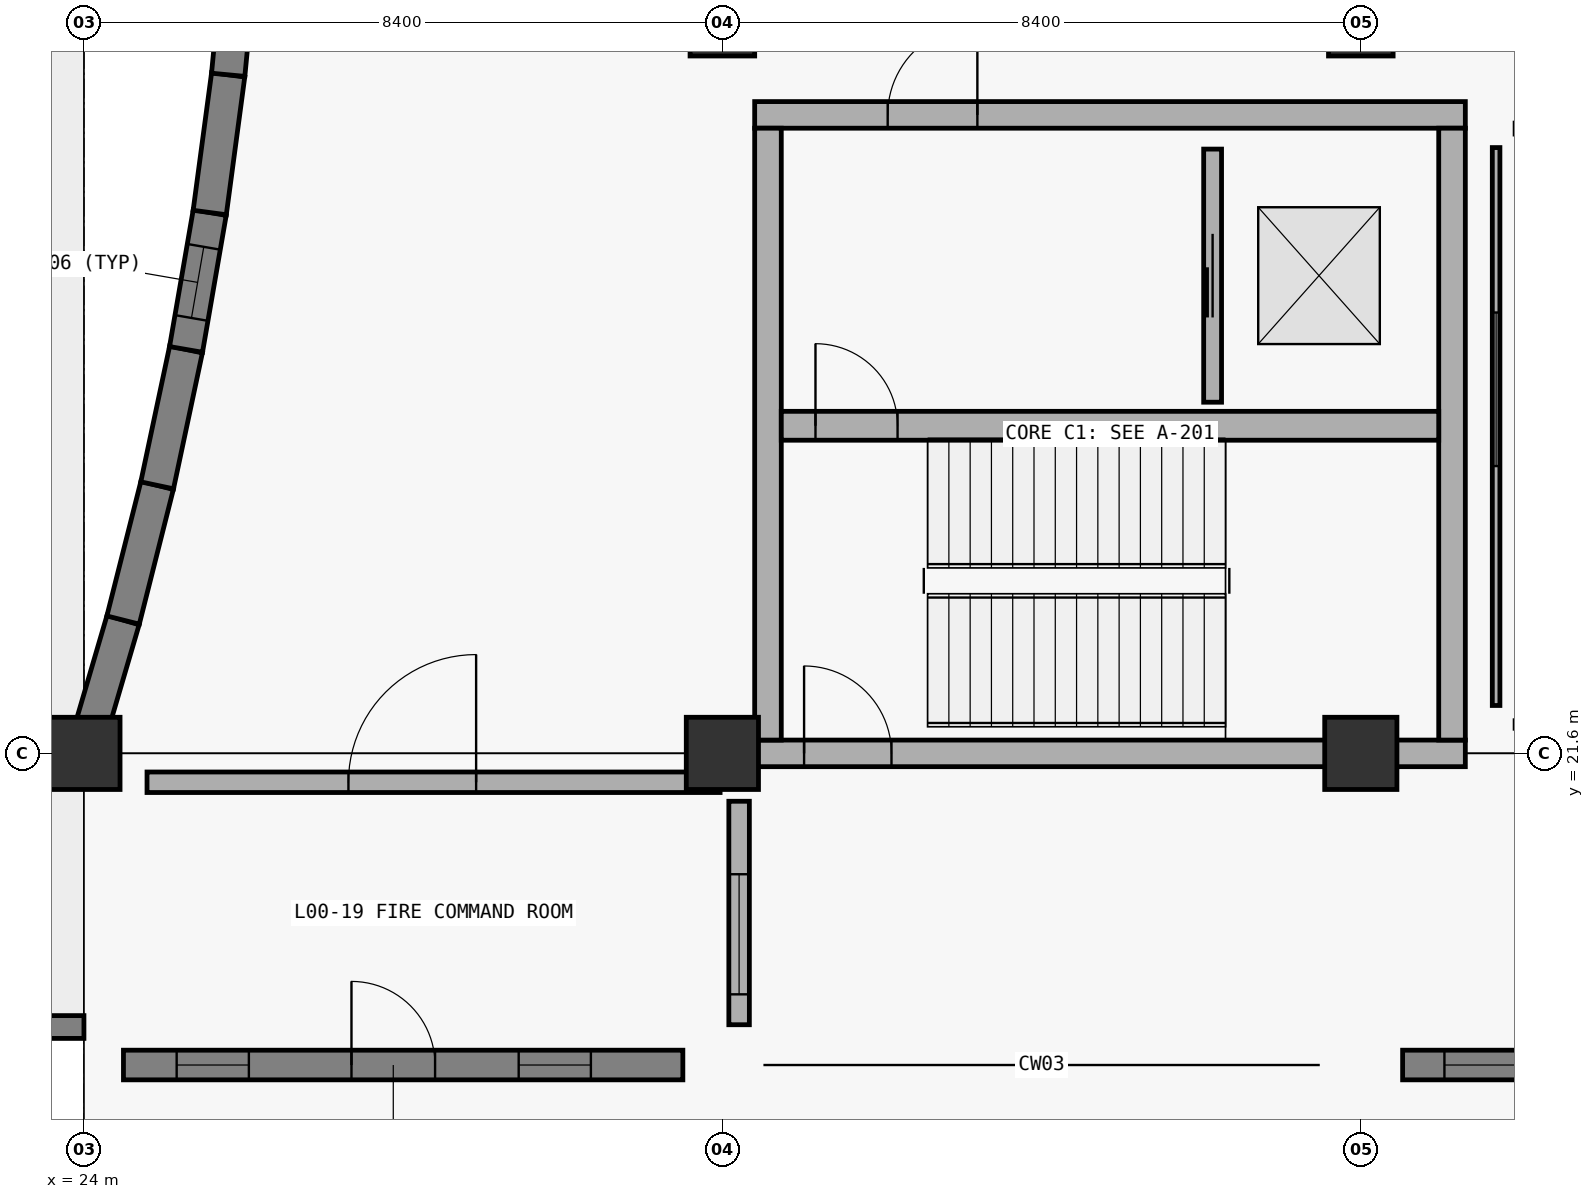
"""IFC4 building model, lengths in metres.
Left out: names, types, materials, properties, quantities, classifications, styles, units other than length and angle.
Written with IfcOpenShell. Run it as: python <this file> out.ifc"""

import sys

from ifc_helpers import new_model, si_unit, direction, frame, frame_2d, origin, origin_2d, place, context, subcontext, project, spatial, rectangle, extrude, element, fill, save


model = new_model("IFC4")
c1 = context("Model", 3, precision=1e-05, world=origin(), true_north=direction((0.0, 1.0)))
c2 = subcontext(c1, "Body", "Model", "MODEL_VIEW")
j1 = project(units=[si_unit("LENGTHUNIT", "METRE"), si_unit("PLANEANGLEUNIT", "RADIAN")], contexts=[c1])
p1 = place(None, origin())
s1 = spatial("IfcSite", under=j1, at=p1, CompositionType="ELEMENT")
p2 = place(p1, origin())
s2 = spatial("IfcBuilding", under=s1, at=p2, CompositionType="ELEMENT")
p3 = place(p2, origin())
s3 = spatial("IfcBuildingStorey", under=s2, at=p3, CompositionType="ELEMENT", Elevation=0.0)
for number, where, z_axis, x_axis in (
    (1, (24.0, 21.6, 0.0), (0.0, 0.0, 1.0), (1.0, 0.0, 0.0)),
    (2, (32.4, 21.6, 0.0), (0.0, 0.0, 1.0), (1.0, 0.0, 0.0)),
):
    element("IfcColumn", number, at=place(p3, frame(where, z_axis=z_axis, x_axis=x_axis)), inside=s3, PredefinedType="COLUMN", context=c2, shape_type="SweptSolid", body=[
        extrude(rectangle(XDim=0.95, YDim=0.95, at=origin_2d()), origin(), (0.0, 0.0, 1.0), 5.4),
    ])
p4 = place(p3, frame((32.4, 31.2, 0.0), z_axis=(0.0, 0.0, 1.0), x_axis=(1.0, 0.0, 0.0)))
e3 = element("IfcColumn", 3, at=p4, inside=s3, PredefinedType="COLUMN", context=c2, shape_type="SweptSolid", body=[
    extrude(rectangle(XDim=0.85, YDim=0.85, at=origin_2d()), origin(), (0.0, 0.0, 1.0), 5.4),
])
p5 = place(p3, frame((40.8, 21.6, 0.0), z_axis=(0.0, 0.0, 1.0), x_axis=(1.0, 0.0, 0.0)))
e4 = element("IfcColumn", 4, at=p5, inside=s3, PredefinedType="COLUMN", context=c2, shape_type="SweptSolid", body=[
    extrude(rectangle(XDim=0.95, YDim=0.95, at=origin_2d()), origin(), (0.0, 0.0, 1.0), 5.4),
])
p6 = place(p3, frame((40.8, 31.2, 0.0), z_axis=(0.0, 0.0, 1.0), x_axis=(1.0, 0.0, 0.0)))
e5 = element("IfcColumn", 5, at=p6, inside=s3, PredefinedType="COLUMN", context=c2, shape_type="SweptSolid", body=[
    extrude(rectangle(XDim=0.85, YDim=0.85, at=origin_2d()), origin(), (0.0, 0.0, 1.0), 5.4),
])
p7 = place(p3, frame((32.825, 21.6, 0.0), z_axis=(0.0, 0.0, 1.0), x_axis=(1.0, 0.0, 0.0)))
e6 = element("IfcWall", 6, at=p7, inside=s3, PredefinedType="SHEAR", context=c2, shape_type="SweptSolid", body=[
    extrude(rectangle(XDim=9.35, YDim=0.35, at=frame_2d((4.675, 0.0))), origin(), (0.0, 0.0, 1.0), 5.4),
])
p8 = place(p7, frame((0.65, 0.0, 0.0)))
e7 = element("IfcOpeningElement", 7, at=p8, cuts=e6, PredefinedType="OPENING", context=c2, shape_type="SweptSolid", body=[
    extrude(rectangle(XDim=1.15, YDim=2.2, at=frame_2d((0.575, 1.1))), frame((0.0, 0.185, 0.0), z_axis=(0.0, -1.0, 0.0), x_axis=(1.0, 0.0, 0.0)), (0.0, 0.0, 1.0), 0.37),
])
p9 = place(p3, frame((32.825, 30.0, 0.0), z_axis=(0.0, 0.0, 1.0), x_axis=(1.0, 0.0, 0.0)))
e8 = element("IfcWall", 8, at=p9, inside=s3, PredefinedType="SHEAR", context=c2, shape_type="SweptSolid", body=[
    extrude(rectangle(XDim=9.35, YDim=0.35, at=frame_2d((4.675, 0.0))), origin(), (0.0, 0.0, 1.0), 5.4),
])
p10 = place(p9, frame((1.75, 0.0, 0.0)))
e9 = element("IfcOpeningElement", 9, at=p10, cuts=e8, PredefinedType="OPENING", context=c2, shape_type="SweptSolid", body=[
    extrude(rectangle(XDim=1.18, YDim=2.24, at=frame_2d((0.59, 1.12))), frame((0.0, 0.185, 0.0), z_axis=(0.0, -1.0, 0.0), x_axis=(1.0, 0.0, 0.0)), (0.0, 0.0, 1.0), 0.37),
])
for number, where, z_axis, x_axis in (
    (10, (33.0, 21.775, 0.0), (0.0, 0.0, 1.0), (0.0, 1.0, 0.0)),
    (11, (42.0, 21.775, 0.0), (0.0, 0.0, 1.0), (0.0, 1.0, 0.0)),
):
    element("IfcWall", number, at=place(p3, frame(where, z_axis=z_axis, x_axis=x_axis)), inside=s3, PredefinedType="SHEAR", context=c2, shape_type="SweptSolid", body=[
        extrude(rectangle(XDim=8.05, YDim=0.35, at=frame_2d((4.025, 0.0))), origin(), (0.0, 0.0, 1.0), 5.4),
    ])
p11 = place(p3, frame((33.175, 25.91, 0.0), z_axis=(0.0, 0.0, 1.0), x_axis=(1.0, 0.0, 0.0)))
e12 = element("IfcWall", 12, at=p11, inside=s3, PredefinedType="SHEAR", context=c2, shape_type="SweptSolid", body=[
    extrude(rectangle(XDim=8.65, YDim=0.38, at=frame_2d((4.325, 0.0))), origin(), (0.0, 0.0, 1.0), 5.4),
])
p12 = place(p11, frame((0.45, 0.0, 0.0)))
e13 = element("IfcOpeningElement", 13, at=p12, cuts=e12, PredefinedType="OPENING", context=c2, shape_type="SweptSolid", body=[
    extrude(rectangle(XDim=1.08, YDim=2.18, at=frame_2d((0.54, 1.09))), frame((0.0, 0.2, 0.0), z_axis=(0.0, -1.0, 0.0), x_axis=(1.0, 0.0, 0.0)), (0.0, 0.0, 1.0), 0.4),
])
p13 = place(p3, frame((8.4, 18.0, -0.2), z_axis=(0.0, 0.0, 1.0), x_axis=(1.0, 0.0, 0.0)))
e14 = element("IfcWall", 14, at=p13, inside=s3, PredefinedType="PARAPET", context=c2, shape_type="SweptSolid", body=[
    extrude(rectangle(XDim=15.6, YDim=0.3, at=frame_2d((7.8, 0.0))), origin(), (0.0, 0.0, 1.0), 0.42),
])
p14 = place(p3, frame((24.0, 21.6, 0.0), z_axis=(0.0, 0.0, 1.0), x_axis=(0.281804764954, 0.959471768448, 0.0)))
e15 = element("IfcWall", 15, at=p14, inside=s3, PredefinedType="SOLIDWALL", context=c2, shape_type="SweptSolid", body=[
    extrude(rectangle(XDim=1.828, YDim=0.44, at=frame_2d((0.914, 0.0))), origin(), (0.0, 0.0, 1.0), 4.59),
])
p15 = place(p3, frame((24.515, 23.354, 0.0), z_axis=(0.0, 0.0, 1.0), x_axis=(0.245080262371, 0.969502792671, 0.0)))
e16 = element("IfcWall", 16, at=p15, inside=s3, PredefinedType="SOLIDWALL", context=c2, shape_type="SweptSolid", body=[
    extrude(rectangle(XDim=1.828, YDim=0.44, at=frame_2d((0.914, 0.0))), origin(), (0.0, 0.0, 1.0), 5.04),
])
p16 = place(p3, frame((24.963, 25.126, 0.0), z_axis=(0.0, 0.0, 1.0), x_axis=(0.207941813813, 0.978141197409, 0.0)))
e17 = element("IfcWall", 17, at=p16, inside=s3, PredefinedType="SOLIDWALL", context=c2, shape_type="SweptSolid", body=[
    extrude(rectangle(XDim=1.828, YDim=0.44, at=frame_2d((0.914, 0.0))), origin(), (0.0, 0.0, 1.0), 5.04),
])
p17 = place(p3, frame((25.343, 26.914, 0.0), z_axis=(0.0, 0.0, 1.0), x_axis=(0.170546420939, 0.985349642667, 0.0)))
e18 = element("IfcWall", 18, at=p17, inside=s3, PredefinedType="SOLIDWALL", context=c2, shape_type="SweptSolid", body=[
    extrude(rectangle(XDim=1.828, YDim=0.44, at=frame_2d((0.914, 0.0))), origin(), (0.0, 0.0, 1.0), 5.04),
])
p18 = place(p17, frame((0.42, 0.0, 0.9)))
e19 = element("IfcOpeningElement", 19, at=p18, cuts=e18, PredefinedType="OPENING", context=c2, shape_type="SweptSolid", body=[
    extrude(rectangle(XDim=0.95, YDim=2.0, at=frame_2d((0.475, 1.0))), frame((0.0, 0.23, 0.0), z_axis=(0.0, -1.0, 0.0), x_axis=(1.0, 0.0, 0.0)), (0.0, 0.0, 1.0), 0.46),
])
p19 = place(p3, frame((25.655, 28.716, 0.0), z_axis=(0.0, 0.0, 1.0), x_axis=(0.132872205914, 0.991133178183, 0.0)))
e20 = element("IfcWall", 20, at=p19, inside=s3, PredefinedType="SOLIDWALL", context=c2, shape_type="SweptSolid", body=[
    extrude(rectangle(XDim=1.828, YDim=0.44, at=frame_2d((0.914, 0.0))), origin(), (0.0, 0.0, 1.0), 5.04),
])
p20 = place(p3, frame((25.898, 30.528, 0.0), z_axis=(0.0, 0.0, 1.0), x_axis=(0.095099032001, 0.995467816714, 0.0)))
e21 = element("IfcWall", 21, at=p20, inside=s3, PredefinedType="SOLIDWALL", context=c2, shape_type="SweptSolid", body=[
    extrude(rectangle(XDim=1.828, YDim=0.44, at=frame_2d((0.914, 0.0))), origin(), (0.0, 0.0, 1.0), 5.04),
])
p21 = place(p20, frame((0.42, 0.0, 0.9)))
e22 = element("IfcOpeningElement", 22, at=p21, cuts=e21, PredefinedType="OPENING", context=c2, shape_type="SweptSolid", body=[
    extrude(rectangle(XDim=0.95, YDim=2.0, at=frame_2d((0.475, 1.0))), frame((0.0, 0.23, 0.0), z_axis=(0.0, -1.0, 0.0), x_axis=(1.0, 0.0, 0.0)), (0.0, 0.0, 1.0), 0.46),
])
p22 = place(p3, frame((41.35, 17.5, 0.0), z_axis=(0.0, 0.0, 1.0), x_axis=(1.0, 0.0, 0.0)))
e23 = element("IfcWall", 23, at=p22, inside=s3, PredefinedType="SOLIDWALL", context=c2, shape_type="SweptSolid", body=[
    extrude(rectangle(XDim=7.3, YDim=0.39, at=frame_2d((3.65, 0.0))), origin(), (0.0, 0.0, 1.0), 5.0),
])
p23 = place(p22, frame((0.55, 0.0, 0.85)))
e24 = element("IfcOpeningElement", 24, at=p23, cuts=e23, PredefinedType="OPENING", context=c2, shape_type="SweptSolid", body=[
    extrude(rectangle(XDim=1.5, YDim=2.35, at=frame_2d((0.75, 1.175))), frame((0.0, 0.205, 0.0), z_axis=(0.0, -1.0, 0.0), x_axis=(1.0, 0.0, 0.0)), (0.0, 0.0, 1.0), 0.41),
])
p24 = place(p22, frame((5.2, 0.0, 0.85)))
e25 = element("IfcOpeningElement", 25, at=p24, cuts=e23, PredefinedType="OPENING", context=c2, shape_type="SweptSolid", body=[
    extrude(rectangle(XDim=1.5, YDim=2.35, at=frame_2d((0.75, 1.175))), frame((0.0, 0.205, 0.0), z_axis=(0.0, -1.0, 0.0), x_axis=(1.0, 0.0, 0.0)), (0.0, 0.0, 1.0), 0.41),
])
p25 = place(p22, frame((2.65, 0.0, 0.0)))
e26 = element("IfcOpeningElement", 26, at=p25, cuts=e23, PredefinedType="OPENING", context=c2, shape_type="SweptSolid", body=[
    extrude(rectangle(XDim=2.0, YDim=2.55, at=frame_2d((1.0, 1.275))), frame((0.0, 0.205, 0.0), z_axis=(0.0, -1.0, 0.0), x_axis=(1.0, 0.0, 0.0)), (0.0, 0.0, 1.0), 0.41),
])
p26 = place(p3, frame((24.52, 17.5, 0.0), z_axis=(0.0, 0.0, 1.0), x_axis=(1.0, 0.0, 0.0)))
e27 = element("IfcWall", 27, at=p26, inside=s3, PredefinedType="SOLIDWALL", context=c2, shape_type="SweptSolid", body=[
    extrude(rectangle(XDim=7.36, YDim=0.39, at=frame_2d((3.68, 0.0))), origin(), (0.0, 0.0, 1.0), 4.09),
])
p27 = place(p26, frame((0.7, 0.0, 0.9)))
e28 = element("IfcOpeningElement", 28, at=p27, cuts=e27, PredefinedType="OPENING", context=c2, shape_type="SweptSolid", body=[
    extrude(rectangle(XDim=0.95, YDim=2.0, at=frame_2d((0.475, 1.0))), frame((0.0, 0.205, 0.0), z_axis=(0.0, -1.0, 0.0), x_axis=(1.0, 0.0, 0.0)), (0.0, 0.0, 1.0), 0.41),
])
p28 = place(p26, frame((5.2, 0.0, 0.9)))
e29 = element("IfcOpeningElement", 29, at=p28, cuts=e27, PredefinedType="OPENING", context=c2, shape_type="SweptSolid", body=[
    extrude(rectangle(XDim=0.95, YDim=2.0, at=frame_2d((0.475, 1.0))), frame((0.0, 0.205, 0.0), z_axis=(0.0, -1.0, 0.0), x_axis=(1.0, 0.0, 0.0)), (0.0, 0.0, 1.0), 0.41),
])
p29 = place(p26, frame((3.0, 0.0, 0.0)))
e30 = element("IfcOpeningElement", 30, at=p29, cuts=e27, PredefinedType="OPENING", context=c2, shape_type="SweptSolid", body=[
    extrude(rectangle(XDim=1.1, YDim=2.15, at=frame_2d((0.55, 1.075))), frame((0.0, 0.205, 0.0), z_axis=(0.0, -1.0, 0.0), x_axis=(1.0, 0.0, 0.0)), (0.0, 0.0, 1.0), 0.41),
])
p30 = place(p3, frame((38.85, 26.22, 0.0), z_axis=(0.0, 0.0, 1.0), x_axis=(0.0, 1.0, 0.0)))
e31 = element("IfcWall", 31, at=p30, inside=s3, PredefinedType="PARTITIONING", context=c2, shape_type="SweptSolid", body=[
    extrude(rectangle(XDim=3.33, YDim=0.235, at=frame_2d((1.665, 0.0))), origin(), (0.0, 0.0, 1.0), 5.04),
])
p31 = place(p30, frame((1.115, 0.0, 0.0)))
e32 = element("IfcOpeningElement", 32, at=p31, cuts=e31, PredefinedType="OPENING", context=c2, shape_type="SweptSolid", body=[
    extrude(rectangle(XDim=1.1, YDim=2.2, at=frame_2d((0.55, 1.1))), frame((0.0, 0.127, 0.0), z_axis=(0.0, -1.0, 0.0), x_axis=(1.0, 0.0, 0.0)), (0.0, 0.0, 1.0), 0.255),
])
p32 = place(p3, frame((24.83, 21.22, 0.0), z_axis=(0.0, 0.0, 1.0), x_axis=(1.0, 0.0, 0.0)))
e33 = element("IfcWall", 33, at=p32, inside=s3, PredefinedType="PARTITIONING", context=c2, shape_type="SweptSolid", body=[
    extrude(rectangle(XDim=7.54, YDim=0.27, at=frame_2d((3.77, 0.0))), origin(), (0.0, 0.0, 1.0), 4.09),
])
p33 = place(p32, frame((2.65, 0.0, 0.0)))
e34 = element("IfcOpeningElement", 34, at=p33, cuts=e33, PredefinedType="OPENING", context=c2, shape_type="SweptSolid", body=[
    extrude(rectangle(XDim=1.68, YDim=2.32, at=frame_2d((0.84, 1.16))), frame((0.0, 0.145, 0.0), z_axis=(0.0, -1.0, 0.0), x_axis=(1.0, 0.0, 0.0)), (0.0, 0.0, 1.0), 0.29),
])
p34 = place(p3, frame((32.62, 18.03, 0.0), z_axis=(0.0, 0.0, 1.0), x_axis=(0.0, 1.0, 0.0)))
e35 = element("IfcWall", 35, at=p34, inside=s3, PredefinedType="PARTITIONING", context=c2, shape_type="SweptSolid", body=[
    extrude(rectangle(XDim=2.94, YDim=0.27, at=frame_2d((1.47, 0.0))), origin(), (0.0, 0.0, 1.0), 4.09),
])
p35 = place(p34, frame((0.4, 0.0, 0.9)))
e36 = element("IfcOpeningElement", 36, at=p35, cuts=e35, PredefinedType="OPENING", context=c2, shape_type="SweptSolid", body=[
    extrude(rectangle(XDim=1.58, YDim=1.24, at=frame_2d((0.79, 0.62))), frame((0.0, 0.145, 0.0), z_axis=(0.0, -1.0, 0.0), x_axis=(1.0, 0.0, 0.0)), (0.0, 0.0, 1.0), 0.29),
])
p36 = place(p3, frame((42.58, 22.23, 0.0), z_axis=(0.0, 0.0, 1.0), x_axis=(0.0, 1.0, 0.0)))
e37 = element("IfcWall", 37, at=p36, inside=s3, PredefinedType="PARTITIONING", context=c2, shape_type="SweptSolid", body=[
    extrude(rectangle(XDim=7.34, YDim=0.1, at=frame_2d((3.67, 0.0))), origin(), (0.0, 0.0, 1.0), 5.04),
])
p37 = place(p36, frame((3.15, 0.0, 0.9)))
e38 = element("IfcOpeningElement", 38, at=p37, cuts=e37, PredefinedType="OPENING", context=c2, shape_type="SweptSolid", body=[
    extrude(rectangle(XDim=2.02, YDim=1.32, at=frame_2d((1.01, 0.66))), frame((0.0, 0.06, 0.0), z_axis=(0.0, -1.0, 0.0), x_axis=(1.0, 0.0, 0.0)), (0.0, 0.0, 1.0), 0.12),
])
p38 = place(p18, origin())
e39 = element("IfcWindow", 39, at=p38, inside=s3, PartitioningType="SINGLE_PANEL", PredefinedType="WINDOW", context=c2, shape_type="SweptSolid", body=[
    extrude(rectangle(XDim=0.95, YDim=2.0, at=frame_2d((0.475, 1.0))), frame((0.0, 0.03, 0.0), z_axis=(0.0, -1.0, 0.0), x_axis=(1.0, 0.0, 0.0)), (0.0, 0.0, 1.0), 0.06),
])
fill(e19, e39)
p39 = place(p23, origin())
e40 = element("IfcWindow", 40, at=p39, inside=s3, PartitioningType="SINGLE_PANEL", PredefinedType="WINDOW", context=c2, shape_type="SweptSolid", body=[
    extrude(rectangle(XDim=1.5, YDim=2.35, at=frame_2d((0.75, 1.175))), frame((0.0, 0.03, 0.0), z_axis=(0.0, -1.0, 0.0), x_axis=(1.0, 0.0, 0.0)), (0.0, 0.0, 1.0), 0.06),
])
fill(e24, e40)
p40 = place(p8, origin())
e41 = element("IfcDoor", 41, at=p40, inside=s3, OperationType="SINGLE_SWING_LEFT", PredefinedType="DOOR", context=c2, shape_type="SweptSolid", body=[
    extrude(rectangle(XDim=1.15, YDim=2.2, at=frame_2d((0.575, 1.1))), frame((0.0, 0.025, 0.0), z_axis=(0.0, -1.0, 0.0), x_axis=(1.0, 0.0, 0.0)), (0.0, 0.0, 1.0), 0.05),
])
fill(e7, e41)
p41 = place(p27, origin())
e42 = element("IfcWindow", 42, at=p41, inside=s3, PartitioningType="SINGLE_PANEL", PredefinedType="WINDOW", context=c2, shape_type="SweptSolid", body=[
    extrude(rectangle(XDim=0.95, YDim=2.0, at=frame_2d((0.475, 1.0))), frame((0.0, 0.03, 0.0), z_axis=(0.0, -1.0, 0.0), x_axis=(1.0, 0.0, 0.0)), (0.0, 0.0, 1.0), 0.06),
])
fill(e28, e42)
p42 = place(p28, origin())
e43 = element("IfcWindow", 43, at=p42, inside=s3, PartitioningType="SINGLE_PANEL", PredefinedType="WINDOW", context=c2, shape_type="SweptSolid", body=[
    extrude(rectangle(XDim=0.95, YDim=2.0, at=frame_2d((0.475, 1.0))), frame((0.0, 0.03, 0.0), z_axis=(0.0, -1.0, 0.0), x_axis=(1.0, 0.0, 0.0)), (0.0, 0.0, 1.0), 0.06),
])
fill(e29, e43)
p43 = place(p29, origin())
e44 = element("IfcDoor", 44, at=p43, inside=s3, OperationType="SINGLE_SWING_LEFT", PredefinedType="DOOR", context=c2, shape_type="SweptSolid", body=[
    extrude(rectangle(XDim=1.1, YDim=2.15, at=frame_2d((0.55, 1.075))), frame((0.0, 0.025, 0.0), z_axis=(0.0, -1.0, 0.0), x_axis=(1.0, 0.0, 0.0)), (0.0, 0.0, 1.0), 0.05),
])
fill(e30, e44)
p44 = place(p12, origin())
e45 = element("IfcDoor", 45, at=p44, inside=s3, OperationType="SINGLE_SWING_LEFT", PredefinedType="DOOR", context=c2, shape_type="SweptSolid", body=[
    extrude(rectangle(XDim=1.08, YDim=2.18, at=frame_2d((0.54, 1.09))), frame((0.0, 0.025, 0.0), z_axis=(0.0, -1.0, 0.0), x_axis=(1.0, 0.0, 0.0)), (0.0, 0.0, 1.0), 0.05),
])
fill(e13, e45)
p45 = place(p10, origin())
e46 = element("IfcDoor", 46, at=p45, inside=s3, OperationType="SINGLE_SWING_RIGHT", PredefinedType="DOOR", context=c2, shape_type="SweptSolid", body=[
    extrude(rectangle(XDim=1.18, YDim=2.24, at=frame_2d((0.59, 1.12))), frame((0.0, 0.025, 0.0), z_axis=(0.0, -1.0, 0.0), x_axis=(1.0, 0.0, 0.0)), (0.0, 0.0, 1.0), 0.05),
])
fill(e9, e46)
p46 = place(p31, origin())
e47 = element("IfcDoor", 47, at=p46, inside=s3, OperationType="SLIDING_TO_LEFT", PredefinedType="DOOR", context=c2, shape_type="SweptSolid", body=[
    extrude(rectangle(XDim=1.1, YDim=2.2, at=frame_2d((0.55, 1.1))), frame((0.0, 0.025, 0.0), z_axis=(0.0, -1.0, 0.0), x_axis=(1.0, 0.0, 0.0)), (0.0, 0.0, 1.0), 0.05),
])
fill(e32, e47)
p47 = place(p33, origin())
e48 = element("IfcDoor", 48, at=p47, inside=s3, OperationType="DOUBLE_SWING_RIGHT", PredefinedType="DOOR", context=c2, shape_type="SweptSolid", body=[
    extrude(rectangle(XDim=1.68, YDim=2.32, at=frame_2d((0.84, 1.16))), frame((0.0, 0.025, 0.0), z_axis=(0.0, -1.0, 0.0), x_axis=(1.0, 0.0, 0.0)), (0.0, 0.0, 1.0), 0.05),
])
fill(e34, e48)
p48 = place(p35, origin())
e49 = element("IfcWindow", 49, at=p48, inside=s3, PartitioningType="SINGLE_PANEL", PredefinedType="WINDOW", context=c2, shape_type="SweptSolid", body=[
    extrude(rectangle(XDim=1.58, YDim=1.24, at=frame_2d((0.79, 0.62))), frame((0.0, 0.03, 0.0), z_axis=(0.0, -1.0, 0.0), x_axis=(1.0, 0.0, 0.0)), (0.0, 0.0, 1.0), 0.06),
])
fill(e36, e49)
p49 = place(p37, origin())
e50 = element("IfcWindow", 50, at=p49, inside=s3, PartitioningType="SINGLE_PANEL", PredefinedType="WINDOW", context=c2, shape_type="SweptSolid", body=[
    extrude(rectangle(XDim=2.02, YDim=1.32, at=frame_2d((1.01, 0.66))), frame((0.0, 0.03, 0.0), z_axis=(0.0, -1.0, 0.0), x_axis=(1.0, 0.0, 0.0)), (0.0, 0.0, 1.0), 0.06),
])
fill(e38, e50)
save(model, sys.argv[1])
